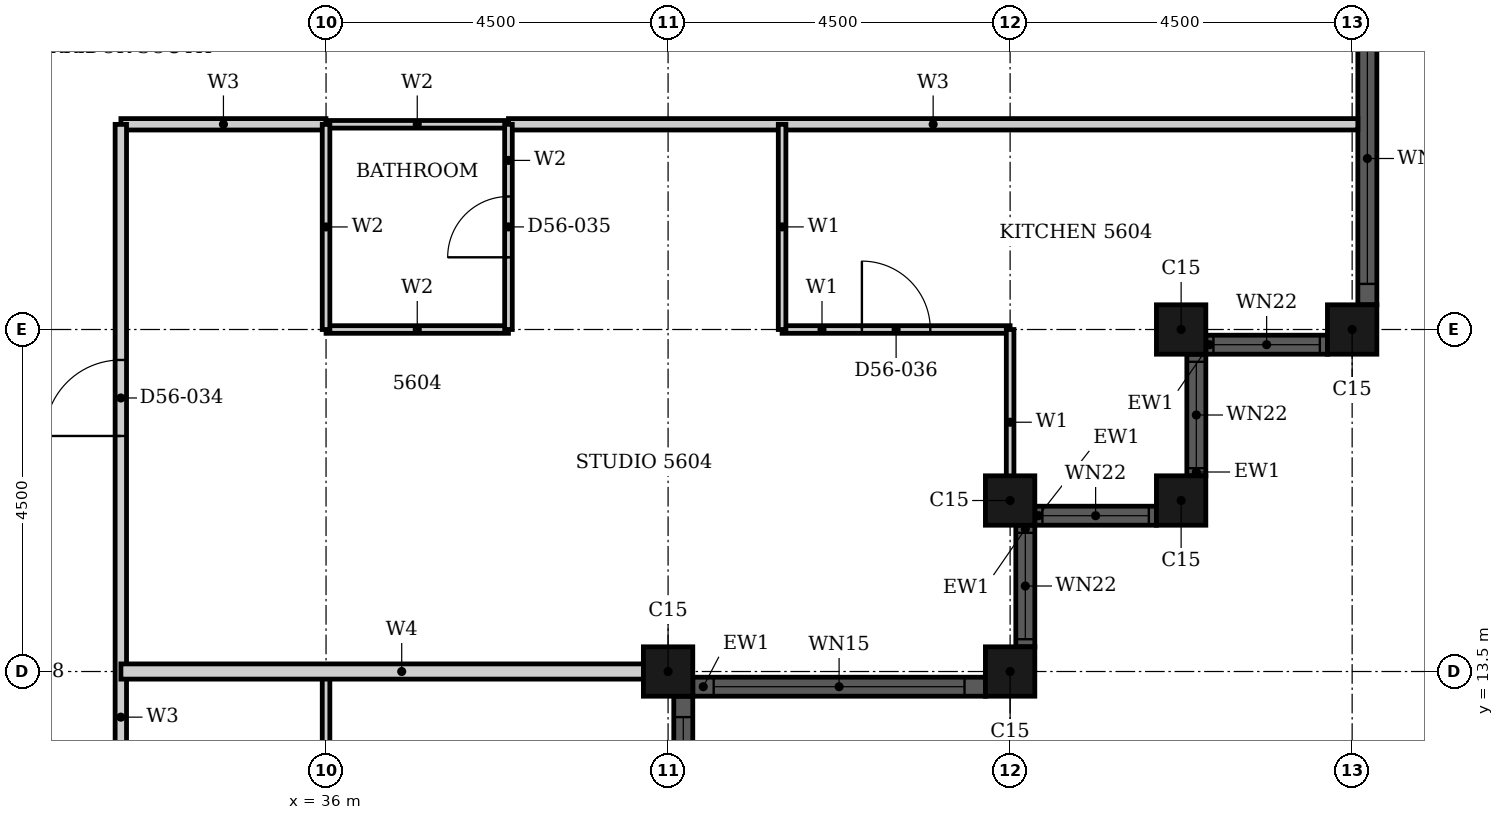
"""IFC4 building model, lengths in metres.
Left out: names, types, materials, properties, quantities, classifications, styles, units other than length and angle.
Written with IfcOpenShell. Run it as: python <this file> out.ifc"""

import sys

from ifc_helpers import new_model, si_unit, direction, frame, frame_2d, origin, origin_2d, place, context, subcontext, project, spatial, rectangle, hollow_rectangle, extrude, element, fill, save


model = new_model("IFC4")
c1 = context("Model", 3, precision=1e-05, world=origin(), true_north=direction((0.0, 1.0)))
c2 = subcontext(c1, "Body", "Model", "MODEL_VIEW")
j1 = project(units=[si_unit("LENGTHUNIT", "METRE"), si_unit("PLANEANGLEUNIT", "RADIAN")], contexts=[c1])
p1 = place(None, origin())
s1 = spatial("IfcSite", under=j1, at=p1, CompositionType="ELEMENT")
p2 = place(p1, origin())
s2 = spatial("IfcBuilding", under=s1, at=p2, CompositionType="ELEMENT")
p3 = place(p2, frame((0.0, 0.0, 222.0)))
s3 = spatial("IfcBuildingStorey", under=s2, at=p3, CompositionType="ELEMENT", Elevation=222.0)
for number, where, z_axis, x_axis in (
    (1, (40.5, 13.5, 0.0), (0.0, 0.0, 1.0), (1.0, 0.0, 0.0)),
    (2, (45.0, 13.5, 0.0), (0.0, 0.0, 1.0), (1.0, 0.0, 0.0)),
    (3, (45.0, 15.75, 0.0), (0.0, 0.0, 1.0), (1.0, 0.0, 0.0)),
    (4, (47.25, 15.75, 0.0), (0.0, 0.0, 1.0), (1.0, 0.0, 0.0)),
    (5, (47.25, 18.0, 0.0), (0.0, 0.0, 1.0), (1.0, 0.0, 0.0)),
    (6, (49.5, 18.0, 0.0), (0.0, 0.0, 1.0), (1.0, 0.0, 0.0)),
):
    element("IfcColumn", number, at=place(p3, frame(where, z_axis=z_axis, x_axis=x_axis)), inside=s3, PredefinedType="COLUMN", context=c2, shape_type="SweptSolid", body=[
        extrude(hollow_rectangle(XDim=0.65, YDim=0.65, WallThickness=0.021, at=origin_2d()), origin(), (0.0, 0.0, 1.0), 3.7),
    ])
p4 = place(p3, frame((40.825, 13.3, 0.0), z_axis=(0.0, 0.0, 1.0), x_axis=(1.0, 0.0, 0.0)))
e7 = element("IfcWall", 7, at=p4, inside=s3, PredefinedType="SOLIDWALL", context=c2, shape_type="SweptSolid", body=[
    extrude(rectangle(XDim=3.85, YDim=0.25, at=frame_2d((1.925, 0.0))), origin(), (0.0, 0.0, 1.0), 3.7),
])
p5 = place(p4, frame((0.275, 0.0, 0.45)))
e8 = element("IfcOpeningElement", 8, at=p5, cuts=e7, PredefinedType="OPENING", context=c2, shape_type="SweptSolid", body=[
    extrude(rectangle(XDim=3.3, YDim=2.3, at=frame_2d((1.65, 1.15))), frame((0.0, 0.135, 0.0), z_axis=(0.0, -1.0, 0.0), x_axis=(1.0, 0.0, 0.0)), (0.0, 0.0, 1.0), 0.27),
])
p6 = place(p3, frame((45.2, 13.825, 0.0), z_axis=(0.0, 0.0, 1.0), x_axis=(0.0, 1.0, 0.0)))
e9 = element("IfcWall", 9, at=p6, inside=s3, PredefinedType="SOLIDWALL", context=c2, shape_type="SweptSolid", body=[
    extrude(rectangle(XDim=1.6, YDim=0.25, at=frame_2d((0.8, 0.0))), origin(), (0.0, 0.0, 1.0), 3.7),
])
p7 = place(p6, frame((0.1, 0.0, 0.9)))
e10 = element("IfcOpeningElement", 10, at=p7, cuts=e9, PredefinedType="OPENING", context=c2, shape_type="SweptSolid", body=[
    extrude(rectangle(XDim=1.4, YDim=1.85, at=frame_2d((0.7, 0.925))), frame((0.0, 0.135, 0.0), z_axis=(0.0, -1.0, 0.0), x_axis=(1.0, 0.0, 0.0)), (0.0, 0.0, 1.0), 0.27),
])
p8 = place(p3, frame((45.325, 15.55, 0.0), z_axis=(0.0, 0.0, 1.0), x_axis=(1.0, 0.0, 0.0)))
e11 = element("IfcWall", 11, at=p8, inside=s3, PredefinedType="SOLIDWALL", context=c2, shape_type="SweptSolid", body=[
    extrude(rectangle(XDim=1.6, YDim=0.25, at=frame_2d((0.8, 0.0))), origin(), (0.0, 0.0, 1.0), 3.7),
])
p9 = place(p8, frame((0.1, 0.0, 0.9)))
e12 = element("IfcOpeningElement", 12, at=p9, cuts=e11, PredefinedType="OPENING", context=c2, shape_type="SweptSolid", body=[
    extrude(rectangle(XDim=1.4, YDim=1.85, at=frame_2d((0.7, 0.925))), frame((0.0, 0.135, 0.0), z_axis=(0.0, -1.0, 0.0), x_axis=(1.0, 0.0, 0.0)), (0.0, 0.0, 1.0), 0.27),
])
p10 = place(p3, frame((47.45, 16.075, 0.0), z_axis=(0.0, 0.0, 1.0), x_axis=(0.0, 1.0, 0.0)))
e13 = element("IfcWall", 13, at=p10, inside=s3, PredefinedType="SOLIDWALL", context=c2, shape_type="SweptSolid", body=[
    extrude(rectangle(XDim=1.6, YDim=0.25, at=frame_2d((0.8, 0.0))), origin(), (0.0, 0.0, 1.0), 3.7),
])
p11 = place(p10, frame((0.1, 0.0, 0.9)))
e14 = element("IfcOpeningElement", 14, at=p11, cuts=e13, PredefinedType="OPENING", context=c2, shape_type="SweptSolid", body=[
    extrude(rectangle(XDim=1.4, YDim=1.85, at=frame_2d((0.7, 0.925))), frame((0.0, 0.135, 0.0), z_axis=(0.0, -1.0, 0.0), x_axis=(1.0, 0.0, 0.0)), (0.0, 0.0, 1.0), 0.27),
])
p12 = place(p3, frame((47.575, 17.8, 0.0), z_axis=(0.0, 0.0, 1.0), x_axis=(1.0, 0.0, 0.0)))
e15 = element("IfcWall", 15, at=p12, inside=s3, PredefinedType="SOLIDWALL", context=c2, shape_type="SweptSolid", body=[
    extrude(rectangle(XDim=1.6, YDim=0.25, at=frame_2d((0.8, 0.0))), origin(), (0.0, 0.0, 1.0), 3.7),
])
p13 = place(p12, frame((0.1, 0.0, 0.9)))
e16 = element("IfcOpeningElement", 16, at=p13, cuts=e15, PredefinedType="OPENING", context=c2, shape_type="SweptSolid", body=[
    extrude(rectangle(XDim=1.4, YDim=1.85, at=frame_2d((0.7, 0.925))), frame((0.0, 0.135, 0.0), z_axis=(0.0, -1.0, 0.0), x_axis=(1.0, 0.0, 0.0)), (0.0, 0.0, 1.0), 0.27),
])
p14 = place(p3, frame((49.7, 18.325, 0.0), z_axis=(0.0, 0.0, 1.0), x_axis=(0.0, 1.0, 0.0)))
e17 = element("IfcWall", 17, at=p14, inside=s3, PredefinedType="SOLIDWALL", context=c2, shape_type="SweptSolid", body=[
    extrude(rectangle(XDim=8.35, YDim=0.25, at=frame_2d((4.175, 0.0))), origin(), (0.0, 0.0, 1.0), 3.7),
])
p15 = place(p14, frame((0.275, 0.0, 0.45)))
e18 = element("IfcOpeningElement", 18, at=p15, cuts=e17, PredefinedType="OPENING", context=c2, shape_type="SweptSolid", body=[
    extrude(rectangle(XDim=3.3, YDim=2.3, at=frame_2d((1.65, 1.15))), frame((0.0, 0.135, 0.0), z_axis=(0.0, -1.0, 0.0), x_axis=(1.0, 0.0, 0.0)), (0.0, 0.0, 1.0), 0.27),
])
p16 = place(p14, frame((4.775, 0.0, 0.45)))
e19 = element("IfcOpeningElement", 19, at=p16, cuts=e17, PredefinedType="OPENING", context=c2, shape_type="SweptSolid", body=[
    extrude(rectangle(XDim=3.3, YDim=2.3, at=frame_2d((1.65, 1.15))), frame((0.0, 0.135, 0.0), z_axis=(0.0, -1.0, 0.0), x_axis=(1.0, 0.0, 0.0)), (0.0, 0.0, 1.0), 0.27),
])
p17 = place(p3, frame((40.7, 4.825, 0.0), z_axis=(0.0, 0.0, 1.0), x_axis=(0.0, 1.0, 0.0)))
e20 = element("IfcWall", 20, at=p17, inside=s3, PredefinedType="SOLIDWALL", context=c2, shape_type="SweptSolid", body=[
    extrude(rectangle(XDim=8.35, YDim=0.25, at=frame_2d((4.175, 0.0))), origin(), (0.0, 0.0, 1.0), 3.7),
])
p18 = place(p17, frame((0.275, 0.0, 0.45)))
e21 = element("IfcOpeningElement", 21, at=p18, cuts=e20, PredefinedType="OPENING", context=c2, shape_type="SweptSolid", body=[
    extrude(rectangle(XDim=3.3, YDim=2.3, at=frame_2d((1.65, 1.15))), frame((0.0, 0.135, 0.0), z_axis=(0.0, -1.0, 0.0), x_axis=(1.0, 0.0, 0.0)), (0.0, 0.0, 1.0), 0.27),
])
p19 = place(p17, frame((4.775, 0.0, 0.45)))
e22 = element("IfcOpeningElement", 22, at=p19, cuts=e20, PredefinedType="OPENING", context=c2, shape_type="SweptSolid", body=[
    extrude(rectangle(XDim=3.3, YDim=2.3, at=frame_2d((1.65, 1.15))), frame((0.0, 0.135, 0.0), z_axis=(0.0, -1.0, 0.0), x_axis=(1.0, 0.0, 0.0)), (0.0, 0.0, 1.0), 0.27),
])
p20 = place(p3, frame((33.301, 20.7, 0.0), z_axis=(0.0, 0.0, 1.0), x_axis=(1.0, 0.0, 0.0)))
e23 = element("IfcWall", 23, at=p20, inside=s3, PredefinedType="PARTITIONING", context=c2, shape_type="SweptSolid", body=[
    extrude(rectangle(XDim=2.698, YDim=0.15, at=frame_2d((1.349, 0.0))), origin(), (0.0, 0.0, 1.0), 3.4),
])
p21 = place(p3, frame((38.4, 20.7, 0.0), z_axis=(0.0, 0.0, 1.0), x_axis=(1.0, 0.0, 0.0)))
e24 = element("IfcWall", 24, at=p21, inside=s3, PredefinedType="PARTITIONING", context=c2, shape_type="SweptSolid", body=[
    extrude(rectangle(XDim=11.175, YDim=0.15, at=frame_2d((5.587, 0.0))), origin(), (0.0, 0.0, 1.0), 3.4),
])
p22 = place(p3, frame((33.3, 6.9, 0.0), z_axis=(0.0, 0.0, 1.0), x_axis=(0.0, 1.0, 0.0)))
e25 = element("IfcWall", 25, at=p22, inside=s3, PredefinedType="PARTITIONING", context=c2, shape_type="SweptSolid", body=[
    extrude(rectangle(XDim=13.799, YDim=0.15, at=frame_2d((6.899, 0.0))), origin(), (0.0, 0.0, 1.0), 3.4),
])
p23 = place(p22, frame((9.699, 0.0, 0.0)))
e26 = element("IfcOpeningElement", 26, at=p23, cuts=e25, PredefinedType="OPENING", context=c2, shape_type="SweptSolid", body=[
    extrude(rectangle(XDim=1.0, YDim=2.2, at=frame_2d((0.5, 1.1))), frame((0.0, 0.085, 0.0), z_axis=(0.0, -1.0, 0.0), x_axis=(1.0, 0.0, 0.0)), (0.0, 0.0, 1.0), 0.17),
])
p24 = place(p22, frame((1.3, 0.0, 0.0)))
e27 = element("IfcOpeningElement", 27, at=p24, cuts=e25, PredefinedType="OPENING", context=c2, shape_type="SweptSolid", body=[
    extrude(rectangle(XDim=1.0, YDim=2.2, at=frame_2d((0.5, 1.1))), frame((0.0, 0.085, 0.0), z_axis=(0.0, -1.0, 0.0), x_axis=(1.0, 0.0, 0.0)), (0.0, 0.0, 1.0), 0.17),
])
p25 = place(p3, frame((42.0, 18.0, 0.0), z_axis=(0.0, 0.0, 1.0), x_axis=(1.0, 0.0, 0.0)))
e28 = element("IfcWall", 28, at=p25, inside=s3, PredefinedType="PARTITIONING", context=c2, shape_type="SweptSolid", body=[
    extrude(rectangle(XDim=3.0, YDim=0.1, at=frame_2d((1.5, 0.0))), origin(), (0.0, 0.0, 1.0), 3.4),
])
p26 = place(p25, frame((1.05, 0.0, 0.0)))
e29 = element("IfcOpeningElement", 29, at=p26, cuts=e28, PredefinedType="OPENING", context=c2, shape_type="SweptSolid", body=[
    extrude(rectangle(XDim=0.9, YDim=2.1, at=frame_2d((0.45, 1.05))), frame((0.0, 0.06, 0.0), z_axis=(0.0, -1.0, 0.0), x_axis=(1.0, 0.0, 0.0)), (0.0, 0.0, 1.0), 0.12),
])
p27 = place(p3, frame((36.0, 10.5, 0.0), z_axis=(0.0, 0.0, 1.0), x_axis=(0.0, 1.0, 0.0)))
e30 = element("IfcWall", 30, at=p27, inside=s3, PredefinedType="PARTITIONING", context=c2, shape_type="SweptSolid", body=[
    extrude(rectangle(XDim=3.0, YDim=0.1, at=frame_2d((1.5, 0.0))), origin(), (0.0, 0.0, 1.0), 2.68),
])
p28 = place(p27, frame((1.05, 0.0, 0.0)))
e31 = element("IfcOpeningElement", 31, at=p28, cuts=e30, PredefinedType="OPENING", context=c2, shape_type="SweptSolid", body=[
    extrude(rectangle(XDim=0.9, YDim=2.1, at=frame_2d((0.45, 1.05))), frame((0.0, 0.06, 0.0), z_axis=(0.0, -1.0, 0.0), x_axis=(1.0, 0.0, 0.0)), (0.0, 0.0, 1.0), 0.12),
])
p29 = place(p3, frame((42.0, 18.0, 0.0), z_axis=(0.0, 0.0, 1.0), x_axis=(0.0, 1.0, 0.0)))
e32 = element("IfcWall", 32, at=p29, inside=s3, PredefinedType="PARTITIONING", context=c2, shape_type="SweptSolid", body=[
    extrude(rectangle(XDim=2.7, YDim=0.1, at=frame_2d((1.35, 0.0))), origin(), (0.0, 0.0, 1.0), 3.4),
])
p30 = place(p3, frame((45.0, 15.56, 0.0), z_axis=(0.0, 0.0, 1.0), x_axis=(0.0, 1.0, 0.0)))
e33 = element("IfcWall", 33, at=p30, inside=s3, PredefinedType="PARTITIONING", context=c2, shape_type="SweptSolid", body=[
    extrude(rectangle(XDim=2.44, YDim=0.1, at=frame_2d((1.22, 0.0))), origin(), (0.0, 0.0, 1.0), 3.4),
])
p31 = place(p3, frame((33.301, 13.5, 0.0), z_axis=(0.0, 0.0, 1.0), x_axis=(1.0, 0.0, 0.0)))
e34 = element("IfcWall", 34, at=p31, inside=s3, PredefinedType="PARTITIONING", context=c2, shape_type="SweptSolid", body=[
    extrude(rectangle(XDim=7.389, YDim=0.2, at=frame_2d((3.694, 0.0))), origin(), (0.0, 0.0, 1.0), 2.48),
])
for number, where, z_axis, x_axis in (
    (35, (36.0, 18.0, 0.0), (0.0, 0.0, 1.0), (1.0, 0.0, 0.0)),
    (36, (36.0, 20.7, 0.0), (0.0, 0.0, 1.0), (1.0, 0.0, 0.0)),
):
    element("IfcWall", number, at=place(p3, frame(where, z_axis=z_axis, x_axis=x_axis)), inside=s3, PredefinedType="PARTITIONING", context=c2, shape_type="SweptSolid", body=[
        extrude(rectangle(XDim=2.4, YDim=0.1, at=frame_2d((1.2, 0.0))), origin(), (0.0, 0.0, 1.0), 3.4),
    ])
p32 = place(p3, frame((36.0, 18.0, 0.0), z_axis=(0.0, 0.0, 1.0), x_axis=(0.0, 1.0, 0.0)))
e37 = element("IfcWall", 37, at=p32, inside=s3, PredefinedType="PARTITIONING", context=c2, shape_type="SweptSolid", body=[
    extrude(rectangle(XDim=2.699, YDim=0.1, at=frame_2d((1.35, 0.0))), origin(), (0.0, 0.0, 1.0), 3.4),
])
p33 = place(p3, frame((38.4, 18.0, 0.0), z_axis=(0.0, 0.0, 1.0), x_axis=(0.0, 1.0, 0.0)))
e38 = element("IfcWall", 38, at=p33, inside=s3, PredefinedType="PARTITIONING", context=c2, shape_type="SweptSolid", body=[
    extrude(rectangle(XDim=2.7, YDim=0.1, at=frame_2d((1.35, 0.0))), origin(), (0.0, 0.0, 1.0), 3.4),
])
p34 = place(p33, frame((0.95, 0.0, 0.0)))
e39 = element("IfcOpeningElement", 39, at=p34, cuts=e38, PredefinedType="OPENING", context=c2, shape_type="SweptSolid", body=[
    extrude(rectangle(XDim=0.8, YDim=2.1, at=frame_2d((0.4, 1.05))), frame((0.0, 0.06, 0.0), z_axis=(0.0, -1.0, 0.0), x_axis=(1.0, 0.0, 0.0)), (0.0, 0.0, 1.0), 0.12),
])
p35 = place(p5, origin())
e40 = element("IfcWindow", 40, at=p35, inside=s3, PartitioningType="SINGLE_PANEL", PredefinedType="WINDOW", context=c2, shape_type="SweptSolid", body=[
    extrude(rectangle(XDim=3.3, YDim=2.3, at=frame_2d((1.65, 1.15))), frame((0.0, 0.03, 0.0), z_axis=(0.0, -1.0, 0.0), x_axis=(1.0, 0.0, 0.0)), (0.0, 0.0, 1.0), 0.06),
])
fill(e8, e40)
p36 = place(p7, origin())
e41 = element("IfcWindow", 41, at=p36, inside=s3, PartitioningType="SINGLE_PANEL", PredefinedType="WINDOW", context=c2, shape_type="SweptSolid", body=[
    extrude(rectangle(XDim=1.4, YDim=1.85, at=frame_2d((0.7, 0.925))), frame((0.0, 0.03, 0.0), z_axis=(0.0, -1.0, 0.0), x_axis=(1.0, 0.0, 0.0)), (0.0, 0.0, 1.0), 0.06),
])
fill(e10, e41)
p37 = place(p9, origin())
e42 = element("IfcWindow", 42, at=p37, inside=s3, PartitioningType="SINGLE_PANEL", PredefinedType="WINDOW", context=c2, shape_type="SweptSolid", body=[
    extrude(rectangle(XDim=1.4, YDim=1.85, at=frame_2d((0.7, 0.925))), frame((0.0, 0.03, 0.0), z_axis=(0.0, -1.0, 0.0), x_axis=(1.0, 0.0, 0.0)), (0.0, 0.0, 1.0), 0.06),
])
fill(e12, e42)
p38 = place(p11, origin())
e43 = element("IfcWindow", 43, at=p38, inside=s3, PartitioningType="SINGLE_PANEL", PredefinedType="WINDOW", context=c2, shape_type="SweptSolid", body=[
    extrude(rectangle(XDim=1.4, YDim=1.85, at=frame_2d((0.7, 0.925))), frame((0.0, 0.03, 0.0), z_axis=(0.0, -1.0, 0.0), x_axis=(1.0, 0.0, 0.0)), (0.0, 0.0, 1.0), 0.06),
])
fill(e14, e43)
p39 = place(p13, origin())
e44 = element("IfcWindow", 44, at=p39, inside=s3, PartitioningType="SINGLE_PANEL", PredefinedType="WINDOW", context=c2, shape_type="SweptSolid", body=[
    extrude(rectangle(XDim=1.4, YDim=1.85, at=frame_2d((0.7, 0.925))), frame((0.0, 0.03, 0.0), z_axis=(0.0, -1.0, 0.0), x_axis=(1.0, 0.0, 0.0)), (0.0, 0.0, 1.0), 0.06),
])
fill(e16, e44)
p40 = place(p15, origin())
e45 = element("IfcWindow", 45, at=p40, inside=s3, PartitioningType="SINGLE_PANEL", PredefinedType="WINDOW", context=c2, shape_type="SweptSolid", body=[
    extrude(rectangle(XDim=3.3, YDim=2.3, at=frame_2d((1.65, 1.15))), frame((0.0, 0.03, 0.0), z_axis=(0.0, -1.0, 0.0), x_axis=(1.0, 0.0, 0.0)), (0.0, 0.0, 1.0), 0.06),
])
fill(e18, e45)
p41 = place(p19, origin())
e46 = element("IfcWindow", 46, at=p41, inside=s3, PartitioningType="SINGLE_PANEL", PredefinedType="WINDOW", context=c2, shape_type="SweptSolid", body=[
    extrude(rectangle(XDim=3.3, YDim=2.3, at=frame_2d((1.65, 1.15))), frame((0.0, 0.03, 0.0), z_axis=(0.0, -1.0, 0.0), x_axis=(1.0, 0.0, 0.0)), (0.0, 0.0, 1.0), 0.06),
])
fill(e22, e46)
p42 = place(p23, origin())
e47 = element("IfcDoor", 47, at=p42, inside=s3, OperationType="SINGLE_SWING_LEFT", PredefinedType="DOOR", context=c2, shape_type="SweptSolid", body=[
    extrude(rectangle(XDim=1.0, YDim=2.2, at=frame_2d((0.5, 1.1))), frame((0.0, 0.025, 0.0), z_axis=(0.0, -1.0, 0.0), x_axis=(1.0, 0.0, 0.0)), (0.0, 0.0, 1.0), 0.05),
])
fill(e26, e47)
p43 = place(p34, origin())
e48 = element("IfcDoor", 48, at=p43, inside=s3, OperationType="SINGLE_SWING_RIGHT", PredefinedType="DOOR", context=c2, shape_type="SweptSolid", body=[
    extrude(rectangle(XDim=0.8, YDim=2.1, at=frame_2d((0.4, 1.05))), frame((0.0, 0.025, 0.0), z_axis=(0.0, -1.0, 0.0), x_axis=(1.0, 0.0, 0.0)), (0.0, 0.0, 1.0), 0.05),
])
fill(e39, e48)
p44 = place(p26, origin())
e49 = element("IfcDoor", 49, at=p44, inside=s3, OperationType="SINGLE_SWING_LEFT", PredefinedType="DOOR", context=c2, shape_type="SweptSolid", body=[
    extrude(rectangle(XDim=0.9, YDim=2.1, at=frame_2d((0.45, 1.05))), frame((0.0, 0.025, 0.0), z_axis=(0.0, -1.0, 0.0), x_axis=(1.0, 0.0, 0.0)), (0.0, 0.0, 1.0), 0.05),
])
fill(e29, e49)
save(model, sys.argv[1])
